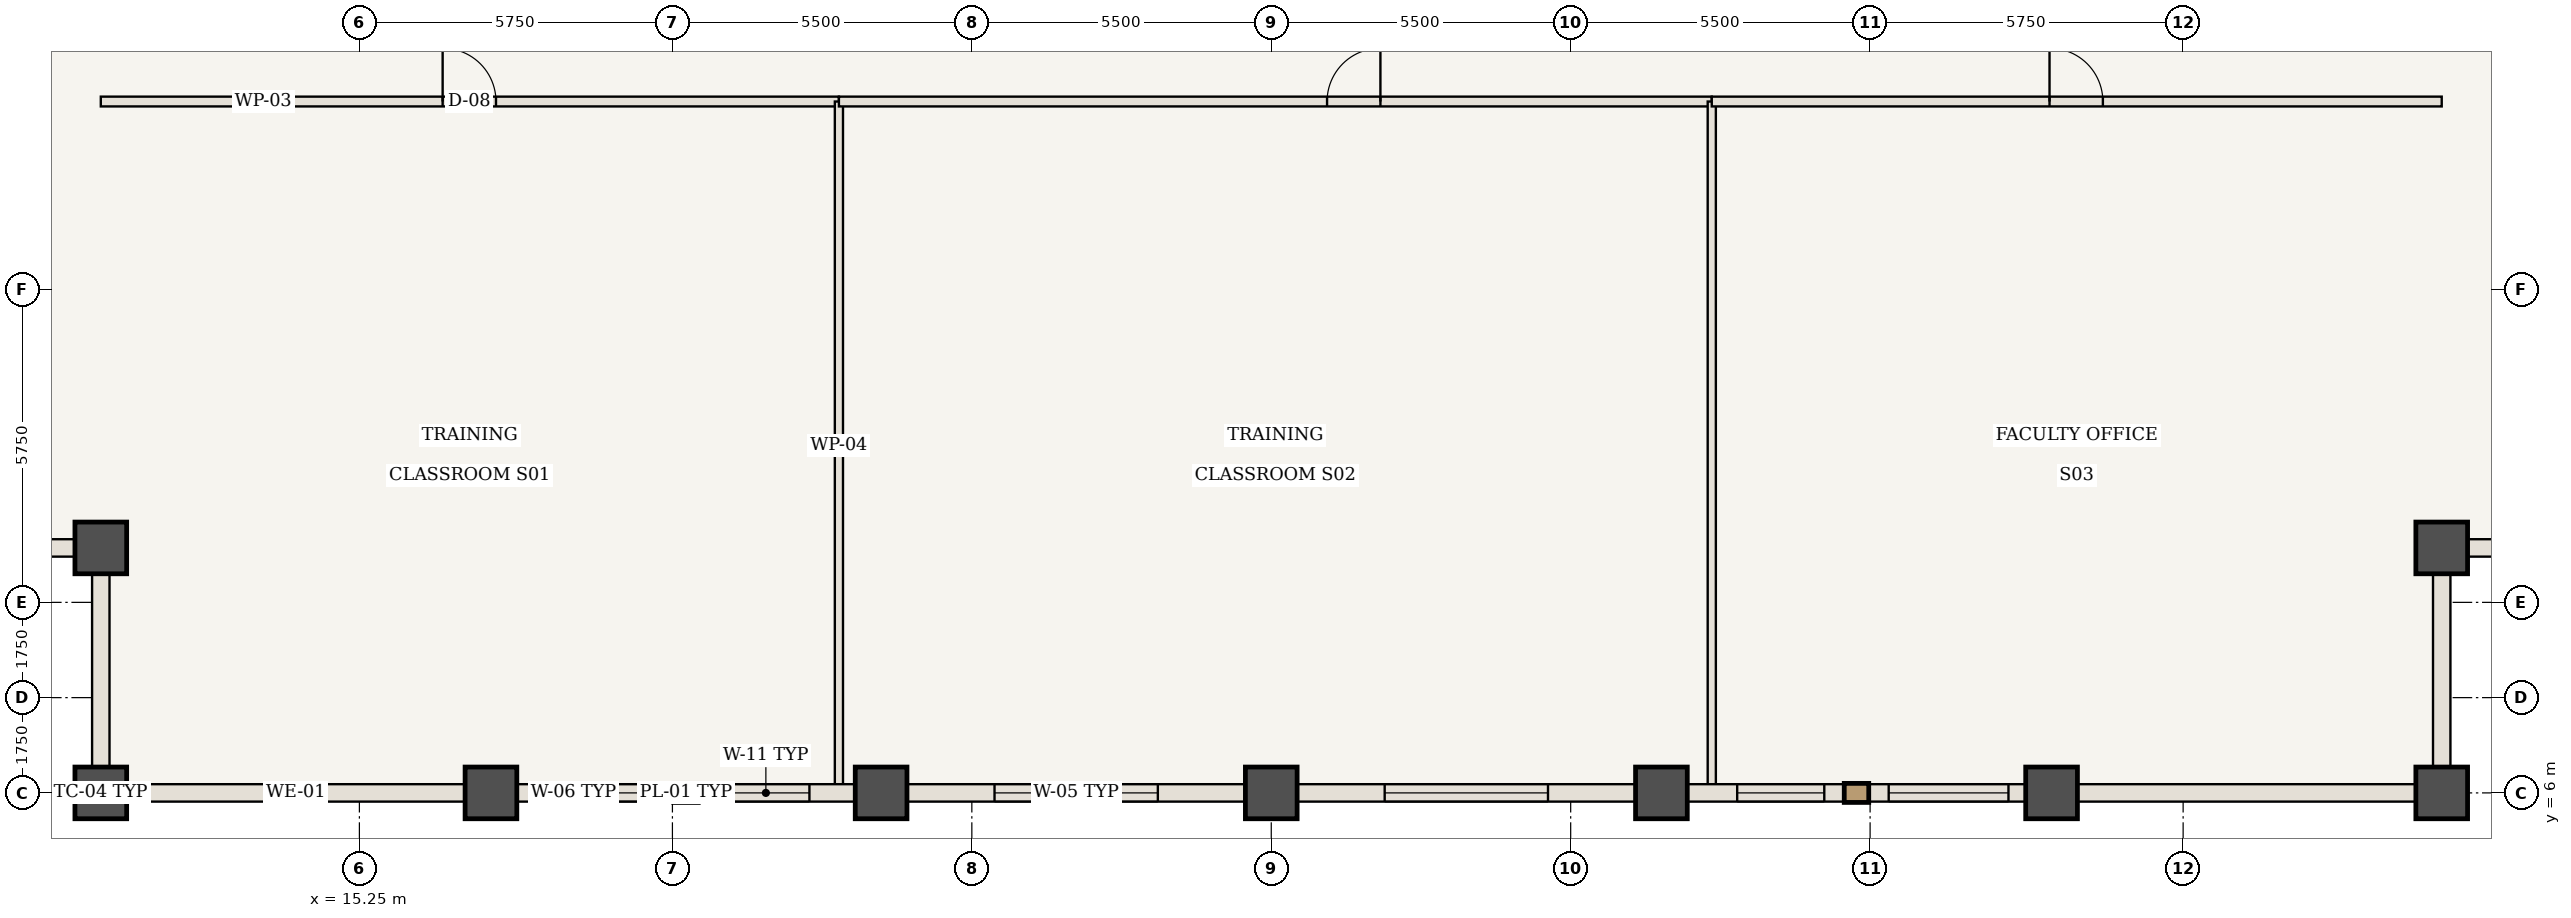
"""IFC4 building model, lengths in metres.
Left out: names, types, materials, properties, quantities, classifications, styles, units other than length and angle.
Written with IfcOpenShell. Run it as: python <this file> out.ifc"""

import sys

from ifc_helpers import new_model, si_unit, direction, frame, frame_2d, origin, origin_2d, place, context, subcontext, project, spatial, rectangle, extrude, element, fill, save


model = new_model("IFC4")
c1 = context("Model", 3, precision=1e-05, world=origin(), true_north=direction((0.0, 1.0)))
c2 = subcontext(c1, "Body", "Model", "MODEL_VIEW")
j1 = project(units=[si_unit("LENGTHUNIT", "METRE"), si_unit("PLANEANGLEUNIT", "RADIAN")], contexts=[c1])
p1 = place(None, origin())
s1 = spatial("IfcSite", under=j1, at=p1, CompositionType="ELEMENT")
p2 = place(p1, origin())
s2 = spatial("IfcBuilding", under=s1, at=p2, CompositionType="ELEMENT")
p3 = place(p2, frame((0.0, 0.0, 141.4)))
s3 = spatial("IfcBuildingStorey", under=s2, at=p3, CompositionType="ELEMENT", Elevation=141.4)
for number, where, z_axis, x_axis in (
    (1, (10.5, 6.0, 0.0), (0.0, 0.0, 1.0), (1.0, 0.0, 0.0)),
    (2, (10.5, 10.5, 0.0), (0.0, 0.0, 1.0), (1.0, 0.0, 0.0)),
    (3, (53.5, 6.0, 0.0), (0.0, 0.0, 1.0), (1.0, 0.0, 0.0)),
    (4, (53.5, 10.5, 0.0), (0.0, 0.0, 1.0), (1.0, 0.0, 0.0)),
    (5, (17.667, 6.0, 0.0), (0.0, 0.0, 1.0), (1.0, 0.0, 0.0)),
    (6, (24.833, 6.0, 0.0), (0.0, 0.0, 1.0), (1.0, 0.0, 0.0)),
    (7, (32.0, 6.0, 0.0), (0.0, 0.0, 1.0), (1.0, 0.0, 0.0)),
    (8, (39.167, 6.0, 0.0), (0.0, 0.0, 1.0), (1.0, 0.0, 0.0)),
    (9, (46.333, 6.0, 0.0), (0.0, 0.0, 1.0), (1.0, 0.0, 0.0)),
):
    element("IfcColumn", number, at=place(p3, frame(where, z_axis=z_axis, x_axis=x_axis)), inside=s3, PredefinedType="COLUMN", context=c2, shape_type="SweptSolid", body=[
        extrude(rectangle(XDim=0.95, YDim=0.95, at=origin_2d()), origin(), (0.0, 0.0, 1.0), 3.85),
    ])
p4 = place(p3, frame((10.5, 18.7, 0.0), z_axis=(0.0, 0.0, 1.0), x_axis=(1.0, 0.0, 0.0)))
e10 = element("IfcWall", 10, at=p4, inside=s3, PredefinedType="STANDARD", context=c2, shape_type="SweptSolid", body=[
    extrude(rectangle(XDim=13.558, YDim=0.18, at=frame_2d((6.779, 0.0))), origin(), (0.0, 0.0, 1.0), 3.685),
])
p5 = place(p4, frame((6.279, 0.0, 0.0)))
e11 = element("IfcOpeningElement", 11, at=p5, cuts=e10, PredefinedType="OPENING", context=c2, shape_type="SweptSolid", body=[
    extrude(rectangle(XDim=0.98, YDim=2.2, at=frame_2d((0.49, 1.1))), frame((0.0, 0.1, 0.0), z_axis=(0.0, -1.0, 0.0), x_axis=(1.0, 0.0, 0.0)), (0.0, 0.0, 1.0), 0.2),
])
p6 = place(p3, frame((24.058, 6.06, 0.0), z_axis=(0.0, 0.0, 1.0), x_axis=(0.0, 1.0, 0.0)))
e12 = element("IfcWall", 12, at=p6, inside=s3, PredefinedType="STANDARD", context=c2, shape_type="SweptSolid", body=[
    extrude(rectangle(XDim=12.64, YDim=0.15, at=frame_2d((6.32, 0.0))), origin(), (0.0, 0.0, 1.0), 3.685),
])
p7 = place(p3, frame((24.058, 18.7, 0.0), z_axis=(0.0, 0.0, 1.0), x_axis=(1.0, 0.0, 0.0)))
e13 = element("IfcWall", 13, at=p7, inside=s3, PredefinedType="STANDARD", context=c2, shape_type="SweptSolid", body=[
    extrude(rectangle(XDim=16.033, YDim=0.18, at=frame_2d((8.017, 0.0))), origin(), (0.0, 0.0, 1.0), 3.685),
])
p8 = place(p7, frame((8.967, 0.0, 0.0)))
e14 = element("IfcOpeningElement", 14, at=p8, cuts=e13, PredefinedType="OPENING", context=c2, shape_type="SweptSolid", body=[
    extrude(rectangle(XDim=0.98, YDim=2.2, at=frame_2d((0.49, 1.1))), frame((0.0, 0.1, 0.0), z_axis=(0.0, -1.0, 0.0), x_axis=(1.0, 0.0, 0.0)), (0.0, 0.0, 1.0), 0.2),
])
p9 = place(p3, frame((40.092, 6.06, 0.0), z_axis=(0.0, 0.0, 1.0), x_axis=(0.0, 1.0, 0.0)))
e15 = element("IfcWall", 15, at=p9, inside=s3, PredefinedType="STANDARD", context=c2, shape_type="SweptSolid", body=[
    extrude(rectangle(XDim=12.64, YDim=0.15, at=frame_2d((6.32, 0.0))), origin(), (0.0, 0.0, 1.0), 3.685),
])
p10 = place(p3, frame((40.092, 18.7, 0.0), z_axis=(0.0, 0.0, 1.0), x_axis=(1.0, 0.0, 0.0)))
e16 = element("IfcWall", 16, at=p10, inside=s3, PredefinedType="STANDARD", context=c2, shape_type="SweptSolid", body=[
    extrude(rectangle(XDim=13.408, YDim=0.18, at=frame_2d((6.704, 0.0))), origin(), (0.0, 0.0, 1.0), 3.685),
])
p11 = place(p10, frame((6.204, 0.0, 0.0)))
e17 = element("IfcOpeningElement", 17, at=p11, cuts=e16, PredefinedType="OPENING", context=c2, shape_type="SweptSolid", body=[
    extrude(rectangle(XDim=0.98, YDim=2.2, at=frame_2d((0.49, 1.1))), frame((0.0, 0.1, 0.0), z_axis=(0.0, -1.0, 0.0), x_axis=(1.0, 0.0, 0.0)), (0.0, 0.0, 1.0), 0.2),
])
p12 = place(p3, frame((17.667, 6.0, 0.0), z_axis=(0.0, 0.0, 1.0), x_axis=(-1.0, 0.0, 0.0)))
e18 = element("IfcWall", 18, at=p12, inside=s3, PredefinedType="USERDEFINED", context=c2, shape_type="SweptSolid", body=[
    extrude(rectangle(XDim=7.167, YDim=0.32, at=frame_2d((3.583, 0.0))), origin(), (0.0, 0.0, 1.0), 2.885),
])
p13 = place(p3, frame((24.833, 6.0, 0.0), z_axis=(0.0, 0.0, 1.0), x_axis=(-1.0, 0.0, 0.0)))
e19 = element("IfcWall", 19, at=p13, inside=s3, PredefinedType="USERDEFINED", context=c2, shape_type="SweptSolid", body=[
    extrude(rectangle(XDim=7.167, YDim=0.32, at=frame_2d((3.583, 0.0))), origin(), (0.0, 0.0, 1.0), 2.885),
])
p14 = place(p13, frame((1.317, 0.0, 0.85)))
e20 = element("IfcOpeningElement", 20, at=p14, cuts=e19, PredefinedType="OPENING", context=c2, shape_type="SweptSolid", body=[
    extrude(rectangle(XDim=1.6, YDim=1.835, at=frame_2d((0.8, 0.917))), frame((0.0, 0.17, 0.0), z_axis=(0.0, -1.0, 0.0), x_axis=(1.0, 0.0, 0.0)), (0.0, 0.0, 1.0), 0.34),
])
p15 = place(p13, frame((4.175, 0.0, 0.85)))
e21 = element("IfcOpeningElement", 21, at=p15, cuts=e19, PredefinedType="OPENING", context=c2, shape_type="SweptSolid", body=[
    extrude(rectangle(XDim=2.2, YDim=1.835, at=frame_2d((1.1, 0.917))), frame((0.0, 0.17, 0.0), z_axis=(0.0, -1.0, 0.0), x_axis=(1.0, 0.0, 0.0)), (0.0, 0.0, 1.0), 0.34),
])
p16 = place(p3, frame((32.0, 6.0, 0.0), z_axis=(0.0, 0.0, 1.0), x_axis=(-1.0, 0.0, 0.0)))
e22 = element("IfcWall", 22, at=p16, inside=s3, PredefinedType="USERDEFINED", context=c2, shape_type="SweptSolid", body=[
    extrude(rectangle(XDim=7.167, YDim=0.32, at=frame_2d((3.583, 0.0))), origin(), (0.0, 0.0, 1.0), 2.885),
])
p17 = place(p16, frame((2.083, 0.0, 0.85)))
e23 = element("IfcOpeningElement", 23, at=p17, cuts=e22, PredefinedType="OPENING", context=c2, shape_type="SweptSolid", body=[
    extrude(rectangle(XDim=3.0, YDim=1.835, at=frame_2d((1.5, 0.917))), frame((0.0, 0.17, 0.0), z_axis=(0.0, -1.0, 0.0), x_axis=(1.0, 0.0, 0.0)), (0.0, 0.0, 1.0), 0.34),
])
p18 = place(p3, frame((39.167, 6.0, 0.0), z_axis=(0.0, 0.0, 1.0), x_axis=(-1.0, 0.0, 0.0)))
e24 = element("IfcWall", 24, at=p18, inside=s3, PredefinedType="USERDEFINED", context=c2, shape_type="SweptSolid", body=[
    extrude(rectangle(XDim=7.167, YDim=0.32, at=frame_2d((3.583, 0.0))), origin(), (0.0, 0.0, 1.0), 2.885),
])
p19 = place(p18, frame((2.083, 0.0, 0.85)))
e25 = element("IfcOpeningElement", 25, at=p19, cuts=e24, PredefinedType="OPENING", context=c2, shape_type="SweptSolid", body=[
    extrude(rectangle(XDim=3.0, YDim=1.835, at=frame_2d((1.5, 0.917))), frame((0.0, 0.17, 0.0), z_axis=(0.0, -1.0, 0.0), x_axis=(1.0, 0.0, 0.0)), (0.0, 0.0, 1.0), 0.34),
])
p20 = place(p3, frame((46.333, 6.0, 0.0), z_axis=(0.0, 0.0, 1.0), x_axis=(-1.0, 0.0, 0.0)))
e26 = element("IfcWall", 26, at=p20, inside=s3, PredefinedType="USERDEFINED", context=c2, shape_type="SweptSolid", body=[
    extrude(rectangle(XDim=7.167, YDim=0.32, at=frame_2d((3.583, 0.0))), origin(), (0.0, 0.0, 1.0), 2.885),
])
p21 = place(p20, frame((0.792, 0.0, 0.85)))
e27 = element("IfcOpeningElement", 27, at=p21, cuts=e26, PredefinedType="OPENING", context=c2, shape_type="SweptSolid", body=[
    extrude(rectangle(XDim=2.2, YDim=1.835, at=frame_2d((1.1, 0.917))), frame((0.0, 0.17, 0.0), z_axis=(0.0, -1.0, 0.0), x_axis=(1.0, 0.0, 0.0)), (0.0, 0.0, 1.0), 0.34),
])
p22 = place(p20, frame((4.175, 0.0, 0.85)))
e28 = element("IfcOpeningElement", 28, at=p22, cuts=e26, PredefinedType="OPENING", context=c2, shape_type="SweptSolid", body=[
    extrude(rectangle(XDim=1.6, YDim=1.835, at=frame_2d((0.8, 0.917))), frame((0.0, 0.17, 0.0), z_axis=(0.0, -1.0, 0.0), x_axis=(1.0, 0.0, 0.0)), (0.0, 0.0, 1.0), 0.34),
])
p23 = place(p3, frame((53.5, 6.0, 0.0), z_axis=(0.0, 0.0, 1.0), x_axis=(-1.0, 0.0, 0.0)))
e29 = element("IfcWall", 29, at=p23, inside=s3, PredefinedType="USERDEFINED", context=c2, shape_type="SweptSolid", body=[
    extrude(rectangle(XDim=7.167, YDim=0.32, at=frame_2d((3.583, 0.0))), origin(), (0.0, 0.0, 1.0), 2.885),
])
for number, where, z_axis, x_axis in (
    (30, (10.5, 6.0, 0.0), (0.0, 0.0, 1.0), (0.0, 1.0, 0.0)),
    (31, (10.5, 10.5, 0.0), (0.0, 0.0, 1.0), (-1.0, 0.0, 0.0)),
    (32, (53.5, 10.5, 0.0), (0.0, 0.0, 1.0), (0.0, -1.0, 0.0)),
    (33, (58.0, 10.5, 0.0), (0.0, 0.0, 1.0), (-1.0, 0.0, 0.0)),
):
    element("IfcWall", number, at=place(p3, frame(where, z_axis=z_axis, x_axis=x_axis)), inside=s3, PredefinedType="USERDEFINED", context=c2, shape_type="SweptSolid", body=[
        extrude(rectangle(XDim=4.5, YDim=0.32, at=frame_2d((2.25, 0.0))), origin(), (0.0, 0.0, 1.0), 2.885),
    ])
p24 = place(p5, origin())
e34 = element("IfcDoor", 34, at=p24, inside=s3, OperationType="SINGLE_SWING_LEFT", PredefinedType="DOOR", context=c2, shape_type="SweptSolid", body=[
    extrude(rectangle(XDim=0.98, YDim=2.2, at=frame_2d((0.49, 1.1))), frame((0.0, 0.025, 0.0), z_axis=(0.0, -1.0, 0.0), x_axis=(1.0, 0.0, 0.0)), (0.0, 0.0, 1.0), 0.05),
])
fill(e11, e34)
p25 = place(p8, origin())
e35 = element("IfcDoor", 35, at=p25, inside=s3, OperationType="SINGLE_SWING_RIGHT", PredefinedType="DOOR", context=c2, shape_type="SweptSolid", body=[
    extrude(rectangle(XDim=0.98, YDim=2.2, at=frame_2d((0.49, 1.1))), frame((0.0, 0.025, 0.0), z_axis=(0.0, -1.0, 0.0), x_axis=(1.0, 0.0, 0.0)), (0.0, 0.0, 1.0), 0.05),
])
fill(e14, e35)
p26 = place(p11, origin())
e36 = element("IfcDoor", 36, at=p26, inside=s3, OperationType="SINGLE_SWING_LEFT", PredefinedType="DOOR", context=c2, shape_type="SweptSolid", body=[
    extrude(rectangle(XDim=0.98, YDim=2.2, at=frame_2d((0.49, 1.1))), frame((0.0, 0.025, 0.0), z_axis=(0.0, -1.0, 0.0), x_axis=(1.0, 0.0, 0.0)), (0.0, 0.0, 1.0), 0.05),
])
fill(e17, e36)
p27 = place(p14, origin())
e37 = element("IfcWindow", 37, at=p27, inside=s3, PartitioningType="SINGLE_PANEL", PredefinedType="WINDOW", context=c2, shape_type="SweptSolid", body=[
    extrude(rectangle(XDim=1.6, YDim=1.835, at=frame_2d((0.8, 0.917))), frame((0.0, 0.03, 0.0), z_axis=(0.0, -1.0, 0.0), x_axis=(1.0, 0.0, 0.0)), (0.0, 0.0, 1.0), 0.06),
])
fill(e20, e37)
p28 = place(p15, origin())
e38 = element("IfcWindow", 38, at=p28, inside=s3, PartitioningType="SINGLE_PANEL", PredefinedType="WINDOW", context=c2, shape_type="SweptSolid", body=[
    extrude(rectangle(XDim=2.2, YDim=1.835, at=frame_2d((1.1, 0.917))), frame((0.0, 0.03, 0.0), z_axis=(0.0, -1.0, 0.0), x_axis=(1.0, 0.0, 0.0)), (0.0, 0.0, 1.0), 0.06),
])
fill(e21, e38)
p29 = place(p17, origin())
e39 = element("IfcWindow", 39, at=p29, inside=s3, PartitioningType="SINGLE_PANEL", PredefinedType="WINDOW", context=c2, shape_type="SweptSolid", body=[
    extrude(rectangle(XDim=3.0, YDim=1.835, at=frame_2d((1.5, 0.917))), frame((0.0, 0.03, 0.0), z_axis=(0.0, -1.0, 0.0), x_axis=(1.0, 0.0, 0.0)), (0.0, 0.0, 1.0), 0.06),
])
fill(e23, e39)
p30 = place(p19, origin())
e40 = element("IfcWindow", 40, at=p30, inside=s3, PartitioningType="SINGLE_PANEL", PredefinedType="WINDOW", context=c2, shape_type="SweptSolid", body=[
    extrude(rectangle(XDim=3.0, YDim=1.835, at=frame_2d((1.5, 0.917))), frame((0.0, 0.03, 0.0), z_axis=(0.0, -1.0, 0.0), x_axis=(1.0, 0.0, 0.0)), (0.0, 0.0, 1.0), 0.06),
])
fill(e25, e40)
p31 = place(p21, origin())
e41 = element("IfcWindow", 41, at=p31, inside=s3, PartitioningType="SINGLE_PANEL", PredefinedType="WINDOW", context=c2, shape_type="SweptSolid", body=[
    extrude(rectangle(XDim=2.2, YDim=1.835, at=frame_2d((1.1, 0.917))), frame((0.0, 0.03, 0.0), z_axis=(0.0, -1.0, 0.0), x_axis=(1.0, 0.0, 0.0)), (0.0, 0.0, 1.0), 0.06),
])
fill(e27, e41)
p32 = place(p22, origin())
e42 = element("IfcWindow", 42, at=p32, inside=s3, PartitioningType="SINGLE_PANEL", PredefinedType="WINDOW", context=c2, shape_type="SweptSolid", body=[
    extrude(rectangle(XDim=1.6, YDim=1.835, at=frame_2d((0.8, 0.917))), frame((0.0, 0.03, 0.0), z_axis=(0.0, -1.0, 0.0), x_axis=(1.0, 0.0, 0.0)), (0.0, 0.0, 1.0), 0.06),
])
fill(e28, e42)
save(model, sys.argv[1])
